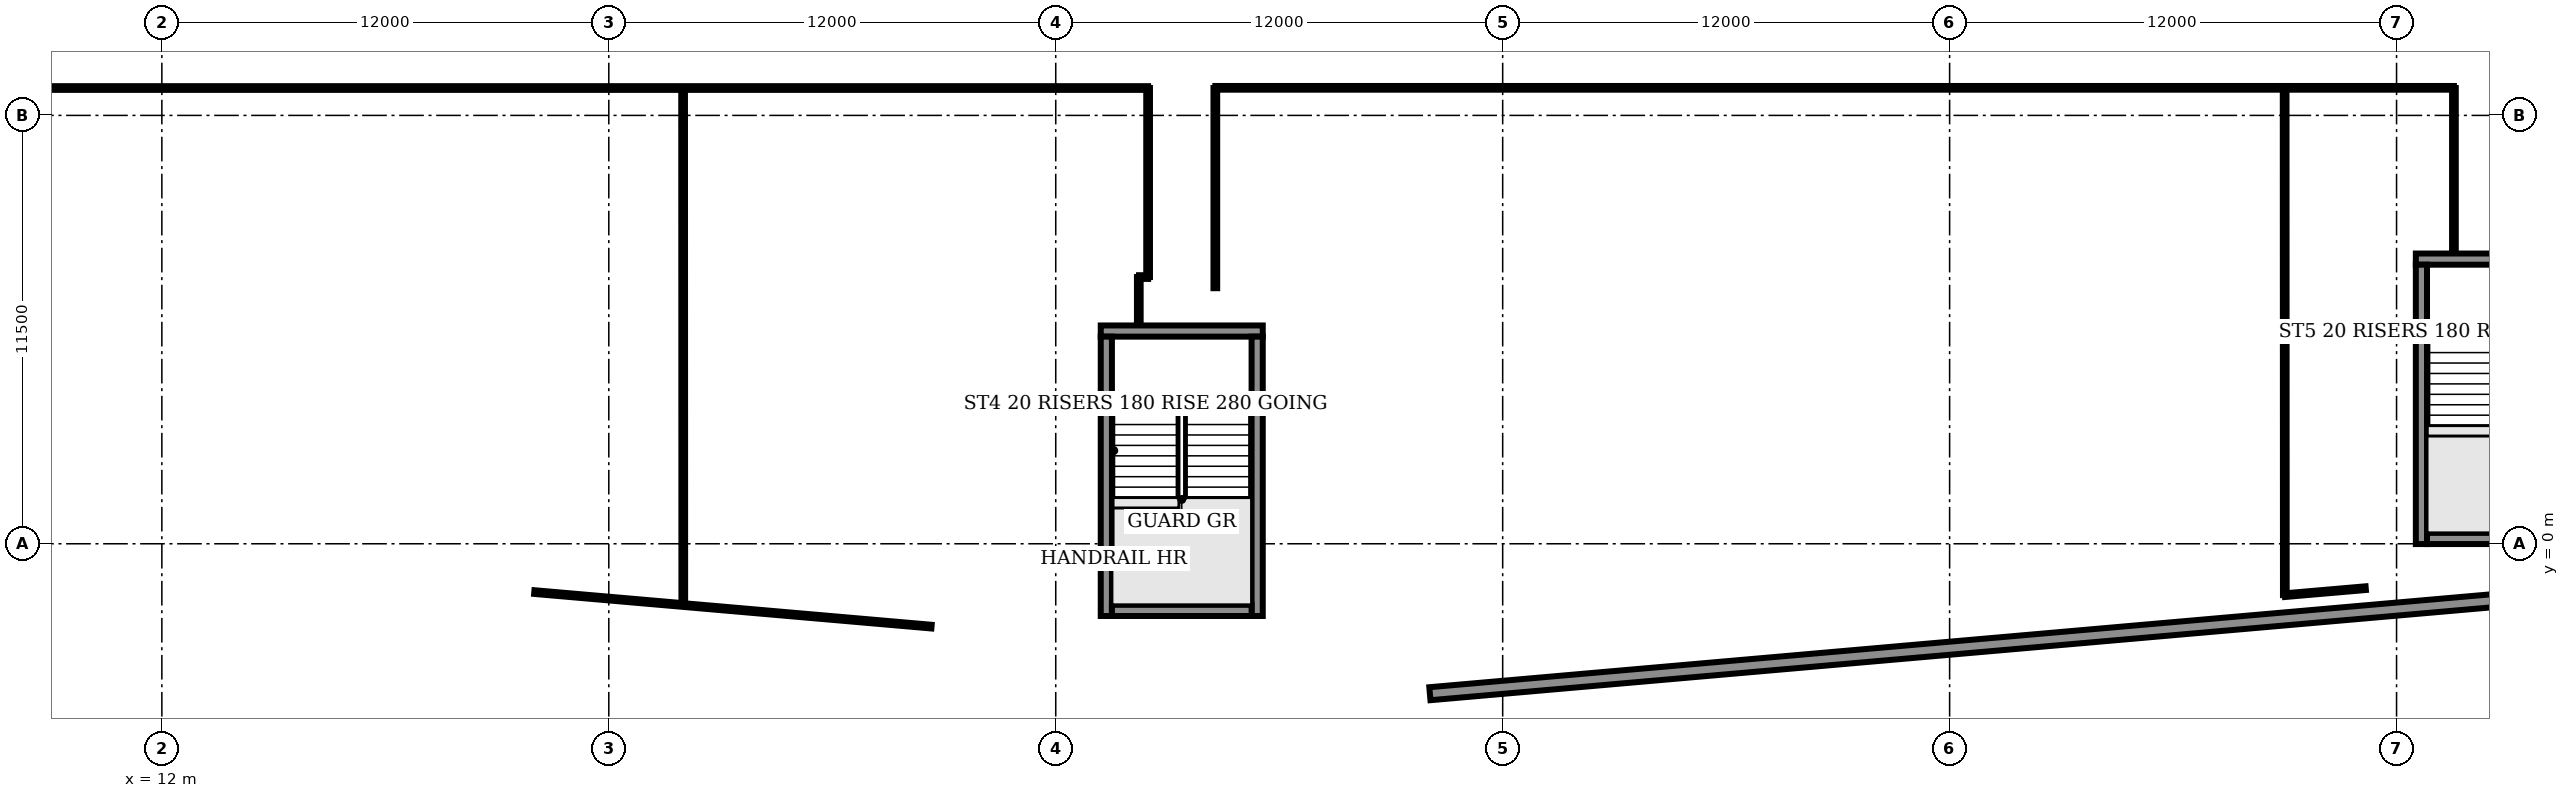
"""IFC4 building model, lengths in metres.
Left out: names, types, materials, properties, quantities, classifications, styles, units other than length and angle.
Written with IfcOpenShell. Run it as: python <this file> out.ifc"""

import sys

from ifc_helpers import new_model, si_unit, direction, frame, frame_2d, origin, origin_2d, place, context, subcontext, project, spatial, rectangle, i_section, extrude, element, fill, save


model = new_model("IFC4")
c1 = context("Model", 3, precision=1e-05, world=origin(), true_north=direction((0.0, 1.0)))
c2 = subcontext(c1, "Body", "Model", "MODEL_VIEW")
j1 = project(units=[si_unit("LENGTHUNIT", "METRE"), si_unit("PLANEANGLEUNIT", "RADIAN")], contexts=[c1])
p1 = place(None, origin())
s1 = spatial("IfcSite", under=j1, at=p1, CompositionType="ELEMENT")
p2 = place(p1, origin())
s2 = spatial("IfcBuilding", under=s1, at=p2, CompositionType="ELEMENT")
p3 = place(p2, frame((0.0, 0.0, 41.5)))
s3 = spatial("IfcBuildingStorey", under=s2, at=p3, CompositionType="ELEMENT", Elevation=41.5)
for number, where, z_axis, x_axis in (
    (1, (19.391, -1.034, 0.0), (0.0, 0.0, 1.0), (-0.087, -0.996, 0.0)),
    (2, (32.724, -2.2, 0.0), (0.0, 0.0, 1.0), (-0.087, -0.996, 0.0)),
    (3, (46.042, -3.268, 0.0), (0.0, 0.0, 1.0), (-0.087, -0.996, 0.0)),
    (4, (57.442, -2.361, 0.0), (0.0, 0.0, 1.0), (0.087, -0.996, 0.0)),
    (5, (68.942, -1.355, 0.0), (0.0, 0.0, 1.0), (0.087, -0.996, 0.0)),
):
    element("IfcColumn", number, at=place(p3, frame(where, z_axis=z_axis, x_axis=x_axis)), inside=s3, PredefinedType="COLUMN", context=c2, shape_type="SweptSolid", body=[
        extrude(i_section(OverallWidth=0.302, OverallDepth=1.008, WebThickness=0.021, FlangeThickness=0.04, FilletRadius=0.03, at=origin_2d()), origin(), (0.0, 0.0, 1.0), 3.6),
    ])
for number, where, z_axis, x_axis in (
    (6, (12.0, 11.5, 0.0), (0.0, 0.0, 1.0), (1.0, 0.0, 0.0)),
    (7, (24.0, 11.5, 0.0), (0.0, 0.0, 1.0), (1.0, 0.0, 0.0)),
    (8, (36.0, 11.5, 0.0), (0.0, 0.0, 1.0), (1.0, 0.0, 0.0)),
    (9, (48.0, 11.5, 0.0), (0.0, 0.0, 1.0), (1.0, 0.0, 0.0)),
    (10, (60.0, 11.5, 0.0), (0.0, 0.0, 1.0), (1.0, 0.0, 0.0)),
    (11, (72.0, 11.5, 0.0), (0.0, 0.0, 1.0), (1.0, 0.0, 0.0)),
):
    element("IfcColumn", number, at=place(p3, frame(where, z_axis=z_axis, x_axis=x_axis)), inside=s3, PredefinedType="COLUMN", context=c2, shape_type="SweptSolid", body=[
        extrude(i_section(OverallWidth=0.305, OverallDepth=0.62, WebThickness=0.021, FlangeThickness=0.04, FilletRadius=0.027, at=origin_2d()), origin(), (0.0, 0.0, 1.0), 3.6),
    ])
p4 = place(p3, frame((5.835, -0.516, 0.0), z_axis=(0.0, 0.0, 1.0), x_axis=(0.996195, -0.087152, 0.0)))
e12 = element("IfcWall", 12, at=p4, inside=s3, PredefinedType="SOLIDWALL", context=c2, shape_type="SweptSolid", body=[
    extrude(rectangle(XDim=40.333, YDim=0.35, at=frame_2d((20.167, 0.0))), origin(), (0.0, 0.0, 1.0), 1.0),
])
p5 = place(p3, frame((46.045, -4.026, 0.0), z_axis=(0.0, 0.0, 1.0), x_axis=(0.996198, 0.08716, 0.0)))
e13 = element("IfcWall", 13, at=p5, inside=s3, PredefinedType="SOLIDWALL", context=c2, shape_type="SweptSolid", body=[
    extrude(rectangle(XDim=43.529, YDim=0.35, at=frame_2d((21.764, 0.0))), origin(), (0.0, 0.0, 1.0), 1.0),
])
p6 = place(p3, frame((37.208, 5.711, 0.0), z_axis=(0.0, 0.0, 1.0), x_axis=(1.0, 0.0, 0.0)))
e14 = element("IfcWall", 14, at=p6, inside=s3, PredefinedType="SHEAR", context=c2, shape_type="SweptSolid", body=[
    extrude(rectangle(XDim=4.35, YDim=0.3, at=frame_2d((2.175, 0.0))), origin(), (0.0, 0.0, 1.0), 3.2),
])
p7 = place(p6, frame((1.575, 0.0, 0.0)))
e15 = element("IfcOpeningElement", 15, at=p7, cuts=e14, PredefinedType="OPENING", context=c2, shape_type="SweptSolid", body=[
    extrude(rectangle(XDim=1.2, YDim=2.1, at=frame_2d((0.6, 1.05))), frame((0.0, 0.16, 0.0), z_axis=(0.0, -1.0, 0.0), x_axis=(1.0, 0.0, 0.0)), (0.0, 0.0, 1.0), 0.32),
])
p8 = place(p3, frame((72.518, 7.642, 0.0), z_axis=(0.0, 0.0, 1.0), x_axis=(1.0, 0.0, 0.0)))
e16 = element("IfcWall", 16, at=p8, inside=s3, PredefinedType="SHEAR", context=c2, shape_type="SweptSolid", body=[
    extrude(rectangle(XDim=4.35, YDim=0.3, at=frame_2d((2.175, 0.0))), origin(), (0.0, 0.0, 1.0), 3.2),
])
p9 = place(p8, frame((1.575, 0.0, 0.0)))
e17 = element("IfcOpeningElement", 17, at=p9, cuts=e16, PredefinedType="OPENING", context=c2, shape_type="SweptSolid", body=[
    extrude(rectangle(XDim=1.2, YDim=2.1, at=frame_2d((0.6, 1.05))), frame((0.0, 0.16, 0.0), z_axis=(0.0, -1.0, 0.0), x_axis=(1.0, 0.0, 0.0)), (0.0, 0.0, 1.0), 0.32),
])
p10 = place(p3, frame((0.02, 12.235, 0.0), z_axis=(0.0, 0.0, 1.0), x_axis=(1.0, 0.0, 0.0)))
e18 = element("IfcWall", 18, at=p10, inside=s3, PredefinedType="PARTITIONING", context=c2, shape_type="SweptSolid", body=[
    extrude(rectangle(XDim=38.46, YDim=0.1, at=frame_2d((19.23, 0.0))), origin(), (0.0, 0.0, 1.0), 3.2),
])
p11 = place(p10, frame((2.405, 0.0, 0.0)))
e19 = element("IfcOpeningElement", 19, at=p11, cuts=e18, PredefinedType="OPENING", context=c2, shape_type="SweptSolid", body=[
    extrude(rectangle(XDim=1.0, YDim=2.1, at=frame_2d((0.5, 1.05))), frame((0.0, 0.06, 0.0), z_axis=(0.0, -1.0, 0.0), x_axis=(1.0, 0.0, 0.0)), (0.0, 0.0, 1.0), 0.12),
])
p12 = place(p10, frame((7.405, 0.0, 0.0)))
e20 = element("IfcOpeningElement", 20, at=p12, cuts=e18, PredefinedType="OPENING", context=c2, shape_type="SweptSolid", body=[
    extrude(rectangle(XDim=1.0, YDim=2.1, at=frame_2d((0.5, 1.05))), frame((0.0, 0.06, 0.0), z_axis=(0.0, -1.0, 0.0), x_axis=(1.0, 0.0, 0.0)), (0.0, 0.0, 1.0), 0.12),
])
p13 = place(p10, frame((13.405, 0.0, 0.0)))
e21 = element("IfcOpeningElement", 21, at=p13, cuts=e18, PredefinedType="OPENING", context=c2, shape_type="SweptSolid", body=[
    extrude(rectangle(XDim=1.0, YDim=2.1, at=frame_2d((0.5, 1.05))), frame((0.0, 0.06, 0.0), z_axis=(0.0, -1.0, 0.0), x_axis=(1.0, 0.0, 0.0)), (0.0, 0.0, 1.0), 0.12),
])
p14 = place(p10, frame((19.48, 0.0, 0.0)))
e22 = element("IfcOpeningElement", 22, at=p14, cuts=e18, PredefinedType="OPENING", context=c2, shape_type="SweptSolid", body=[
    extrude(rectangle(XDim=1.0, YDim=2.1, at=frame_2d((0.5, 1.05))), frame((0.0, 0.06, 0.0), z_axis=(0.0, -1.0, 0.0), x_axis=(1.0, 0.0, 0.0)), (0.0, 0.0, 1.0), 0.12),
])
p15 = place(p10, frame((22.205, 0.0, 0.0)))
e23 = element("IfcOpeningElement", 23, at=p15, cuts=e18, PredefinedType="OPENING", context=c2, shape_type="SweptSolid", body=[
    extrude(rectangle(XDim=1.0, YDim=2.1, at=frame_2d((0.5, 1.05))), frame((0.0, 0.06, 0.0), z_axis=(0.0, -1.0, 0.0), x_axis=(1.0, 0.0, 0.0)), (0.0, 0.0, 1.0), 0.12),
])
p16 = place(p10, frame((34.2, 0.0, 0.0)))
e24 = element("IfcOpeningElement", 24, at=p16, cuts=e18, PredefinedType="OPENING", context=c2, shape_type="SweptSolid", body=[
    extrude(rectangle(XDim=1.0, YDim=2.1, at=frame_2d((0.5, 1.05))), frame((0.0, 0.06, 0.0), z_axis=(0.0, -1.0, 0.0), x_axis=(1.0, 0.0, 0.0)), (0.0, 0.0, 1.0), 0.12),
])
p17 = place(p3, frame((10.0, -0.855, 0.0), z_axis=(0.0, 0.0, 1.0), x_axis=(0.0, 1.0, 0.0)))
e25 = element("IfcWall", 25, at=p17, inside=s3, PredefinedType="PARTITIONING", context=c2, shape_type="SweptSolid", body=[
    extrude(rectangle(XDim=13.09, YDim=0.1, at=frame_2d((6.545, 0.0))), origin(), (0.0, 0.0, 1.0), 3.2),
])
p18 = place(p3, frame((18.0, -0.94, 0.0), z_axis=(0.0, 0.0, 1.0), x_axis=(0.0, 1.0, 0.0)))
e26 = element("IfcWall", 26, at=p18, inside=s3, PredefinedType="PARTITIONING", context=c2, shape_type="SweptSolid", body=[
    extrude(rectangle(XDim=13.175, YDim=0.1, at=frame_2d((6.587, 0.0))), origin(), (0.0, 0.0, 1.0), 3.2),
])
p19 = place(p3, frame((22.0, -1.295, 0.0), z_axis=(0.0, 0.0, 1.0), x_axis=(-0.99611, 0.088069, 0.0)))
e27 = element("IfcWall", 27, at=p19, inside=s3, PredefinedType="PARTITIONING", context=c2, shape_type="SweptSolid", body=[
    extrude(rectangle(XDim=4.017, YDim=0.1, at=frame_2d((2.008, 0.0))), origin(), (0.0, 0.0, 1.0), 2.58),
])
p20 = place(p3, frame((22.0, -1.295, 0.0), z_axis=(0.0, 0.0, 1.0), x_axis=(0.0, 1.0, 0.0)))
e28 = element("IfcWall", 28, at=p20, inside=s3, PredefinedType="PARTITIONING", context=c2, shape_type="SweptSolid", body=[
    extrude(rectangle(XDim=13.53, YDim=0.1, at=frame_2d((6.765, 0.0))), origin(), (0.0, 0.0, 1.0), 3.2),
])
p21 = place(p3, frame((26.0, -1.645, 0.0), z_axis=(0.0, 0.0, 1.0), x_axis=(-0.000352, 1.000004, 0.0)))
e29 = element("IfcWall", 29, at=p21, inside=s3, PredefinedType="PARTITIONING", context=c2, shape_type="SweptSolid", body=[
    extrude(rectangle(XDim=13.88, YDim=0.1, at=frame_2d((6.94, 0.0))), origin(), (0.0, 0.0, 1.0), 3.2),
])
p22 = place(p3, frame((32.665, -2.225, 0.0), z_axis=(0.0, 0.0, 1.0), x_axis=(-0.99623, 0.086702, 0.0)))
e30 = element("IfcWall", 30, at=p22, inside=s3, PredefinedType="PARTITIONING", context=c2, shape_type="SweptSolid", body=[
    extrude(rectangle(XDim=10.706, YDim=0.1, at=frame_2d((5.353, 0.0))), origin(), (0.0, 0.0, 1.0), 2.58),
])
p23 = place(p3, frame((38.23, 5.881, 0.0), z_axis=(0.0, 0.0, 1.0), x_axis=(0.0, 1.0, 0.0)))
e31 = element("IfcWall", 31, at=p23, inside=s3, PredefinedType="PARTITIONING", context=c2, shape_type="SweptSolid", body=[
    extrude(rectangle(XDim=1.279, YDim=0.1, at=frame_2d((0.64, 0.0))), origin(), (0.0, 0.0, 1.0), 3.2),
])
p24 = place(p3, frame((38.235, 7.16, 0.0), z_axis=(0.0, 0.0, 1.0), x_axis=(1.0, 0.0, 0.0)))
e32 = element("IfcWall", 32, at=p24, inside=s3, PredefinedType="PARTITIONING", context=c2, shape_type="SweptSolid", body=[
    extrude(rectangle(XDim=0.245, YDim=0.1, at=frame_2d((0.123, 0.0))), origin(), (0.0, 0.0, 1.0), 3.2),
])
p25 = place(p3, frame((38.48, 7.16, 0.0), z_axis=(0.0, 0.0, 1.0), x_axis=(0.0, 1.0, 0.0)))
e33 = element("IfcWall", 33, at=p25, inside=s3, PredefinedType="PARTITIONING", context=c2, shape_type="SweptSolid", body=[
    extrude(rectangle(XDim=5.075, YDim=0.1, at=frame_2d((2.538, 0.0))), origin(), (0.0, 0.0, 1.0), 3.2),
])
p26 = place(p3, frame((40.285, 6.861, 0.0), z_axis=(0.0, 0.0, 1.0), x_axis=(0.0, 1.0, 0.0)))
e34 = element("IfcWall", 34, at=p26, inside=s3, PredefinedType="PARTITIONING", context=c2, shape_type="SweptSolid", body=[
    extrude(rectangle(XDim=5.375, YDim=0.1, at=frame_2d((2.687, 0.0))), origin(), (0.0, 0.0, 1.0), 3.2),
])
p27 = place(p3, frame((40.285, 12.24, 0.0), z_axis=(0.0, 0.0, 1.0), x_axis=(1.0, 0.0, 0.0)))
e35 = element("IfcWall", 35, at=p27, inside=s3, PredefinedType="PARTITIONING", context=c2, shape_type="SweptSolid", body=[
    extrude(rectangle(XDim=33.255, YDim=0.1, at=frame_2d((16.627, 0.0))), origin(), (0.0, 0.0, 1.0), 3.2),
])
p28 = place(p27, frame((10.235, 0.0, 0.0)))
e36 = element("IfcOpeningElement", 36, at=p28, cuts=e35, PredefinedType="OPENING", context=c2, shape_type="SweptSolid", body=[
    extrude(rectangle(XDim=1.8, YDim=2.1, at=frame_2d((0.9, 1.05))), frame((0.0, 0.06, 0.0), z_axis=(0.0, -1.0, 0.0), x_axis=(1.0, 0.0, 0.0)), (0.0, 0.0, 1.0), 0.12),
])
p29 = place(p3, frame((69.0, -1.38, 0.0), z_axis=(0.0, 0.0, 1.0), x_axis=(-0.000359, 1.000002, 0.0)))
e37 = element("IfcWall", 37, at=p29, inside=s3, PredefinedType="PARTITIONING", context=c2, shape_type="SweptSolid", body=[
    extrude(rectangle(XDim=13.615, YDim=0.1, at=frame_2d((6.808, 0.0))), origin(), (0.0, 0.0, 1.0), 3.2),
])
p30 = place(p3, frame((69.0, -1.38, 0.0), z_axis=(0.0, 0.0, 1.0), x_axis=(0.996261, 0.086427, 0.0)))
e38 = element("IfcWall", 38, at=p30, inside=s3, PredefinedType="PARTITIONING", context=c2, shape_type="SweptSolid", body=[
    extrude(rectangle(XDim=2.181, YDim=0.1, at=frame_2d((1.09, 0.0))), origin(), (0.0, 0.0, 1.0), 2.58),
])
p31 = place(p3, frame((73.54, 7.812, 0.0), z_axis=(0.0, 0.0, 1.0), x_axis=(0.0, 1.0, 0.0)))
e39 = element("IfcWall", 39, at=p31, inside=s3, PredefinedType="PARTITIONING", context=c2, shape_type="SweptSolid", body=[
    extrude(rectangle(XDim=4.423, YDim=0.1, at=frame_2d((2.211, 0.0))), origin(), (0.0, 0.0, 1.0), 3.2),
])
p32 = place(p31, frame((1.943, 0.0, 0.0)))
e40 = element("IfcOpeningElement", 40, at=p32, cuts=e39, PredefinedType="OPENING", context=c2, shape_type="SweptSolid", body=[
    extrude(rectangle(XDim=1.0, YDim=2.1, at=frame_2d((0.5, 1.05))), frame((0.0, 0.06, 0.0), z_axis=(0.0, -1.0, 0.0), x_axis=(1.0, 0.0, 0.0)), (0.0, 0.0, 1.0), 0.12),
])
for number, where, z_axis, x_axis in (
    (41, (37.358, -1.939, 0.0), (0.0, 0.0, 1.0), (0.0, 1.0, 0.0)),
    (42, (41.408, -1.939, 0.0), (0.0, 0.0, 1.0), (0.0, 1.0, 0.0)),
):
    element("IfcWall", number, at=place(p3, frame(where, z_axis=z_axis, x_axis=x_axis)), inside=s3, PredefinedType="SHEAR", context=c2, shape_type="SweptSolid", body=[
        extrude(rectangle(XDim=7.5, YDim=0.3, at=frame_2d((3.75, 0.0))), origin(), (0.0, 0.0, 1.0), 3.2),
    ])
p33 = place(p3, frame((37.508, -1.789, 0.0), z_axis=(0.0, 0.0, 1.0), x_axis=(1.0, 0.0, 0.0)))
e43 = element("IfcWall", 43, at=p33, inside=s3, PredefinedType="SHEAR", context=c2, shape_type="SweptSolid", body=[
    extrude(rectangle(XDim=3.75, YDim=0.3, at=frame_2d((1.875, 0.0))), origin(), (0.0, 0.0, 1.0), 3.2),
])
p34 = place(p3, frame((72.667, -0.008, 0.0), z_axis=(0.0, 0.0, 1.0), x_axis=(0.0, 1.0, 0.0)))
e44 = element("IfcWall", 44, at=p34, inside=s3, PredefinedType="SHEAR", context=c2, shape_type="SweptSolid", body=[
    extrude(rectangle(XDim=7.5, YDim=0.3, at=frame_2d((3.75, 0.0))), origin(), (0.0, 0.0, 1.0), 3.2),
])
p35 = place(p3, frame((72.817, 0.142, 0.0), z_axis=(0.0, 0.0, 1.0), x_axis=(1.0, 0.0, 0.0)))
e45 = element("IfcWall", 45, at=p35, inside=s3, PredefinedType="SHEAR", context=c2, shape_type="SweptSolid", body=[
    extrude(rectangle(XDim=3.75, YDim=0.3, at=frame_2d((1.875, 0.0))), origin(), (0.0, 0.0, 1.0), 3.2),
])
p36 = place(p7, origin())
e46 = element("IfcDoor", 46, at=p36, inside=s3, OperationType="SINGLE_SWING_RIGHT", PredefinedType="DOOR", context=c2, shape_type="SweptSolid", body=[
    extrude(rectangle(XDim=1.2, YDim=2.1, at=frame_2d((0.6, 1.05))), frame((0.0, 0.025, 0.0), z_axis=(0.0, -1.0, 0.0), x_axis=(1.0, 0.0, 0.0)), (0.0, 0.0, 1.0), 0.05),
])
fill(e15, e46)
p37 = place(p9, origin())
e47 = element("IfcDoor", 47, at=p37, inside=s3, OperationType="SINGLE_SWING_RIGHT", PredefinedType="DOOR", context=c2, shape_type="SweptSolid", body=[
    extrude(rectangle(XDim=1.2, YDim=2.1, at=frame_2d((0.6, 1.05))), frame((0.0, 0.025, 0.0), z_axis=(0.0, -1.0, 0.0), x_axis=(1.0, 0.0, 0.0)), (0.0, 0.0, 1.0), 0.05),
])
fill(e17, e47)
p38 = place(p32, origin())
e48 = element("IfcDoor", 48, at=p38, inside=s3, OperationType="SINGLE_SWING_RIGHT", PredefinedType="DOOR", context=c2, shape_type="SweptSolid", body=[
    extrude(rectangle(XDim=1.0, YDim=2.1, at=frame_2d((0.5, 1.05))), frame((0.0, 0.025, 0.0), z_axis=(0.0, -1.0, 0.0), x_axis=(1.0, 0.0, 0.0)), (0.0, 0.0, 1.0), 0.05),
])
fill(e40, e48)
p39 = place(p13, origin())
e49 = element("IfcDoor", 49, at=p39, inside=s3, OperationType="SINGLE_SWING_LEFT", PredefinedType="DOOR", context=c2, shape_type="SweptSolid", body=[
    extrude(rectangle(XDim=1.0, YDim=2.1, at=frame_2d((0.5, 1.05))), frame((0.0, 0.025, 0.0), z_axis=(0.0, -1.0, 0.0), x_axis=(1.0, 0.0, 0.0)), (0.0, 0.0, 1.0), 0.05),
])
fill(e21, e49)
p40 = place(p14, origin())
e50 = element("IfcDoor", 50, at=p40, inside=s3, OperationType="SINGLE_SWING_RIGHT", PredefinedType="DOOR", context=c2, shape_type="SweptSolid", body=[
    extrude(rectangle(XDim=1.0, YDim=2.1, at=frame_2d((0.5, 1.05))), frame((0.0, 0.025, 0.0), z_axis=(0.0, -1.0, 0.0), x_axis=(1.0, 0.0, 0.0)), (0.0, 0.0, 1.0), 0.05),
])
fill(e22, e50)
p41 = place(p15, origin())
e51 = element("IfcDoor", 51, at=p41, inside=s3, OperationType="SINGLE_SWING_RIGHT", PredefinedType="DOOR", context=c2, shape_type="SweptSolid", body=[
    extrude(rectangle(XDim=1.0, YDim=2.1, at=frame_2d((0.5, 1.05))), frame((0.0, 0.025, 0.0), z_axis=(0.0, -1.0, 0.0), x_axis=(1.0, 0.0, 0.0)), (0.0, 0.0, 1.0), 0.05),
])
fill(e23, e51)
p42 = place(p16, origin())
e52 = element("IfcDoor", 52, at=p42, inside=s3, OperationType="SINGLE_SWING_RIGHT", PredefinedType="DOOR", context=c2, shape_type="SweptSolid", body=[
    extrude(rectangle(XDim=1.0, YDim=2.1, at=frame_2d((0.5, 1.05))), frame((0.0, 0.025, 0.0), z_axis=(0.0, -1.0, 0.0), x_axis=(1.0, 0.0, 0.0)), (0.0, 0.0, 1.0), 0.05),
])
fill(e24, e52)
p43 = place(p28, origin())
e53 = element("IfcDoor", 53, at=p43, inside=s3, OperationType="DOUBLE_DOOR_SINGLE_SWING", PredefinedType="DOOR", context=c2, shape_type="SweptSolid", body=[
    extrude(rectangle(XDim=1.8, YDim=2.1, at=frame_2d((0.9, 1.05))), frame((0.0, 0.025, 0.0), z_axis=(0.0, -1.0, 0.0), x_axis=(1.0, 0.0, 0.0)), (0.0, 0.0, 1.0), 0.05),
])
fill(e36, e53)
save(model, sys.argv[1])
